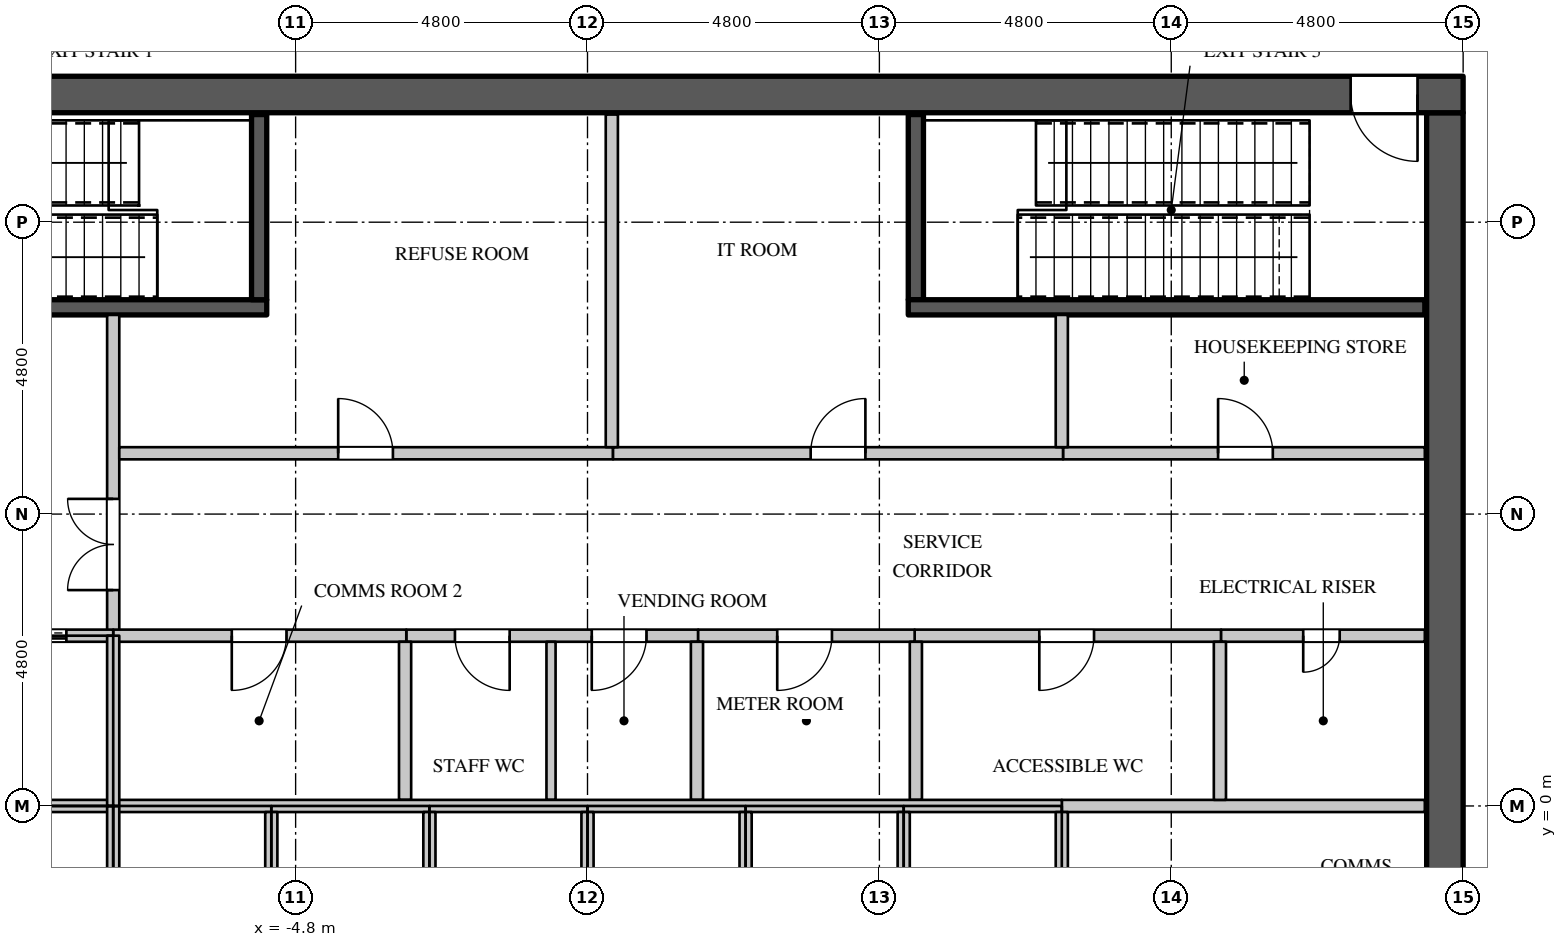
"""IFC4 building model, lengths in metres.
Left out: names, types, materials, properties, quantities, classifications, styles, units other than length and angle.
Written with IfcOpenShell. Run it as: python <this file> out.ifc"""

import sys

from ifc_helpers import new_model, si_unit, direction, frame, frame_2d, origin, place, context, subcontext, project, spatial, rectangle, extrude, element, fill, save


model = new_model("IFC4")
c1 = context("Model", 3, precision=1e-05, world=origin(), true_north=direction((0.0, 1.0)))
c2 = subcontext(c1, "Body", "Model", "MODEL_VIEW")
j1 = project(units=[si_unit("LENGTHUNIT", "METRE"), si_unit("PLANEANGLEUNIT", "RADIAN")], contexts=[c1])
p1 = place(None, origin())
s1 = spatial("IfcSite", under=j1, at=p1, CompositionType="ELEMENT")
p2 = place(p1, origin())
s2 = spatial("IfcBuilding", under=s1, at=p2, CompositionType="ELEMENT")
p3 = place(p2, frame((0.0, 0.0, 314.7)))
s3 = spatial("IfcBuildingStorey", under=s2, at=p3, CompositionType="ELEMENT", Elevation=314.7)
p4 = place(p3, frame((-14.4, 11.7, 0.0), z_axis=(0.0, 0.0, 1.0), x_axis=(1.0, 0.0, 0.0)))
e1 = element("IfcWall", 1, at=p4, inside=s3, PredefinedType="SHEAR", context=c2, shape_type="SweptSolid", body=[
    extrude(rectangle(XDim=28.8, YDim=0.6, at=frame_2d((14.4, 0.0))), origin(), (0.0, 0.0, 1.0), 5.4),
])
p5 = place(p4, frame((0.75, 0.0, 0.0)))
e2 = element("IfcOpeningElement", 2, at=p5, cuts=e1, PredefinedType="OPENING", context=c2, shape_type="SweptSolid", body=[
    extrude(rectangle(XDim=1.1, YDim=2.2, at=frame_2d((0.55, 1.1))), frame((0.0, 0.31, 0.0), z_axis=(0.0, -1.0, 0.0), x_axis=(1.0, 0.0, 0.0)), (0.0, 0.0, 1.0), 0.62),
])
p6 = place(p4, frame((26.95, 0.0, 0.0)))
e3 = element("IfcOpeningElement", 3, at=p6, cuts=e1, PredefinedType="OPENING", context=c2, shape_type="SweptSolid", body=[
    extrude(rectangle(XDim=1.1, YDim=2.2, at=frame_2d((0.55, 1.1))), frame((0.0, 0.31, 0.0), z_axis=(0.0, -1.0, 0.0), x_axis=(1.0, 0.0, 0.0)), (0.0, 0.0, 1.0), 0.62),
])
p7 = place(p3, frame((14.1, -11.4, 0.0), z_axis=(0.0, 0.0, 1.0), x_axis=(0.0, 1.0, 0.0)))
e4 = element("IfcWall", 4, at=p7, inside=s3, PredefinedType="SHEAR", context=c2, shape_type="SweptSolid", body=[
    extrude(rectangle(XDim=22.8, YDim=0.6, at=frame_2d((11.4, 0.0))), origin(), (0.0, 0.0, 1.0), 5.4),
])
p8 = place(p7, frame((6.35, 0.0, 0.0)))
e5 = element("IfcOpeningElement", 5, at=p8, cuts=e4, PredefinedType="OPENING", context=c2, shape_type="SweptSolid", body=[
    extrude(rectangle(XDim=1.5, YDim=2.4, at=frame_2d((0.75, 1.2))), frame((0.0, 0.31, 0.0), z_axis=(0.0, -1.0, 0.0), x_axis=(1.0, 0.0, 0.0)), (0.0, 0.0, 1.0), 0.62),
])
p9 = place(p3, frame((-7.8, 2.8, 0.0), z_axis=(0.0, 0.0, 1.0), x_axis=(0.0, 1.0, 0.0)))
e6 = element("IfcWall", 6, at=p9, inside=s3, PredefinedType="PARTITIONING", context=c2, shape_type="SweptSolid", body=[
    extrude(rectangle(XDim=5.275, YDim=0.2, at=frame_2d((2.637, 0.0))), origin(), (0.0, 0.0, 1.0), 5.1),
])
p10 = place(p9, frame((0.75, 0.0, 0.0)))
e7 = element("IfcOpeningElement", 7, at=p10, cuts=e6, PredefinedType="OPENING", context=c2, shape_type="SweptSolid", body=[
    extrude(rectangle(XDim=1.5, YDim=2.4, at=frame_2d((0.75, 1.2))), frame((0.0, 0.11, 0.0), z_axis=(0.0, -1.0, 0.0), x_axis=(1.0, 0.0, 0.0)), (0.0, 0.0, 1.0), 0.22),
])
p11 = place(p3, frame((-7.7, 5.8, 0.0), z_axis=(0.0, 0.0, 1.0), x_axis=(1.0, 0.0, 0.0)))
e8 = element("IfcWall", 8, at=p11, inside=s3, PredefinedType="PARTITIONING", context=c2, shape_type="SweptSolid", body=[
    extrude(rectangle(XDim=8.12, YDim=0.2, at=frame_2d((4.06, 0.0))), origin(), (0.0, 0.0, 1.0), 5.1),
])
p12 = place(p11, frame((3.6, 0.0, 0.0)))
e9 = element("IfcOpeningElement", 9, at=p12, cuts=e8, PredefinedType="OPENING", context=c2, shape_type="SweptSolid", body=[
    extrude(rectangle(XDim=0.9, YDim=2.2, at=frame_2d((0.45, 1.1))), frame((0.0, 0.11, 0.0), z_axis=(0.0, -1.0, 0.0), x_axis=(1.0, 0.0, 0.0)), (0.0, 0.0, 1.0), 0.22),
])
p13 = place(p3, frame((-2.98, 2.8, 0.0), z_axis=(0.0, 0.0, 1.0), x_axis=(1.0, 0.0, 0.0)))
e10 = element("IfcWall", 10, at=p13, inside=s3, PredefinedType="PARTITIONING", context=c2, shape_type="SweptSolid", body=[
    extrude(rectangle(XDim=4.8, YDim=0.2, at=frame_2d((2.4, 0.0))), origin(), (0.0, 0.0, 1.0), 5.1),
])
p14 = place(p13, frame((0.8, 0.0, 0.0)))
e11 = element("IfcOpeningElement", 11, at=p14, cuts=e10, PredefinedType="OPENING", context=c2, shape_type="SweptSolid", body=[
    extrude(rectangle(XDim=0.9, YDim=2.2, at=frame_2d((0.45, 1.1))), frame((0.0, 0.11, 0.0), z_axis=(0.0, -1.0, 0.0), x_axis=(1.0, 0.0, 0.0)), (0.0, 0.0, 1.0), 0.22),
])
p15 = place(p13, frame((3.05, 0.0, 0.0)))
e12 = element("IfcOpeningElement", 12, at=p15, cuts=e10, PredefinedType="OPENING", context=c2, shape_type="SweptSolid", body=[
    extrude(rectangle(XDim=0.9, YDim=2.2, at=frame_2d((0.45, 1.1))), frame((0.0, 0.11, 0.0), z_axis=(0.0, -1.0, 0.0), x_axis=(1.0, 0.0, 0.0)), (0.0, 0.0, 1.0), 0.22),
])
p16 = place(p3, frame((5.38, 2.8, 0.0), z_axis=(0.0, 0.0, 1.0), x_axis=(1.0, 0.0, 0.0)))
e13 = element("IfcWall", 13, at=p16, inside=s3, PredefinedType="PARTITIONING", context=c2, shape_type="SweptSolid", body=[
    extrude(rectangle(XDim=5.04, YDim=0.2, at=frame_2d((2.52, 0.0))), origin(), (0.0, 0.0, 1.0), 5.1),
])
p17 = place(p16, frame((2.05, 0.0, 0.0)))
e14 = element("IfcOpeningElement", 14, at=p17, cuts=e13, PredefinedType="OPENING", context=c2, shape_type="SweptSolid", body=[
    extrude(rectangle(XDim=0.9, YDim=2.2, at=frame_2d((0.45, 1.1))), frame((0.0, 0.11, 0.0), z_axis=(0.0, -1.0, 0.0), x_axis=(1.0, 0.0, 0.0)), (0.0, 0.0, 1.0), 0.22),
])
p18 = place(p3, frame((7.82, 5.8, 0.0), z_axis=(0.0, 0.0, 1.0), x_axis=(1.0, 0.0, 0.0)))
e15 = element("IfcWall", 15, at=p18, inside=s3, PredefinedType="PARTITIONING", context=c2, shape_type="SweptSolid", body=[
    extrude(rectangle(XDim=5.95, YDim=0.2, at=frame_2d((2.975, 0.0))), origin(), (0.0, 0.0, 1.0), 5.1),
])
p19 = place(p18, frame((2.55, 0.0, 0.0)))
e16 = element("IfcOpeningElement", 16, at=p19, cuts=e15, PredefinedType="OPENING", context=c2, shape_type="SweptSolid", body=[
    extrude(rectangle(XDim=0.9, YDim=2.2, at=frame_2d((0.45, 1.1))), frame((0.0, 0.11, 0.0), z_axis=(0.0, -1.0, 0.0), x_axis=(1.0, 0.0, 0.0)), (0.0, 0.0, 1.0), 0.22),
])
p20 = place(p3, frame((-0.6, 0.1, 0.0), z_axis=(0.0, 0.0, 1.0), x_axis=(0.0, 1.0, 0.0)))
e17 = element("IfcWall", 17, at=p20, inside=s3, PredefinedType="PARTITIONING", context=c2, shape_type="SweptSolid", body=[
    extrude(rectangle(XDim=2.6, YDim=0.15, at=frame_2d((1.3, 0.0))), origin(), (0.0, 0.0, 1.0), 5.1),
])
p21 = place(p3, frame((-7.8, 2.8, 0.0), z_axis=(0.0, 0.0, 1.0), x_axis=(1.0, 0.0, 0.0)))
e18 = element("IfcWall", 18, at=p21, inside=s3, PredefinedType="PARTITIONING", context=c2, shape_type="SweptSolid", body=[
    extrude(rectangle(XDim=4.82, YDim=0.2, at=frame_2d((2.41, 0.0))), origin(), (0.0, 0.0, 1.0), 5.1),
])
p22 = place(p21, frame((1.95, 0.0, 0.0)))
e19 = element("IfcOpeningElement", 19, at=p22, cuts=e18, PredefinedType="OPENING", context=c2, shape_type="SweptSolid", body=[
    extrude(rectangle(XDim=0.9, YDim=2.2, at=frame_2d((0.45, 1.1))), frame((0.0, 0.11, 0.0), z_axis=(0.0, -1.0, 0.0), x_axis=(1.0, 0.0, 0.0)), (0.0, 0.0, 1.0), 0.22),
])
p23 = place(p3, frame((-3.0, 0.1, 0.0), z_axis=(0.0, 0.0, 1.0), x_axis=(0.0, 1.0, 0.0)))
e20 = element("IfcWall", 20, at=p23, inside=s3, PredefinedType="PARTITIONING", context=c2, shape_type="SweptSolid", body=[
    extrude(rectangle(XDim=2.6, YDim=0.2, at=frame_2d((1.3, 0.0))), origin(), (0.0, 0.0, 1.0), 5.1),
])
p24 = place(p3, frame((0.42, 5.8, 0.0), z_axis=(0.0, 0.0, 1.0), x_axis=(1.0, 0.0, 0.0)))
e21 = element("IfcWall", 21, at=p24, inside=s3, PredefinedType="PARTITIONING", context=c2, shape_type="SweptSolid", body=[
    extrude(rectangle(XDim=7.4, YDim=0.2, at=frame_2d((3.7, 0.0))), origin(), (0.0, 0.0, 1.0), 5.1),
])
p25 = place(p24, frame((3.25, 0.0, 0.0)))
e22 = element("IfcOpeningElement", 22, at=p25, cuts=e21, PredefinedType="OPENING", context=c2, shape_type="SweptSolid", body=[
    extrude(rectangle(XDim=0.9, YDim=2.2, at=frame_2d((0.45, 1.1))), frame((0.0, 0.11, 0.0), z_axis=(0.0, -1.0, 0.0), x_axis=(1.0, 0.0, 0.0)), (0.0, 0.0, 1.0), 0.22),
])
p26 = place(p3, frame((0.4, 5.9, 0.0), z_axis=(0.0, 0.0, 1.0), x_axis=(0.0, 1.0, 0.0)))
e23 = element("IfcWall", 23, at=p26, inside=s3, PredefinedType="PARTITIONING", context=c2, shape_type="SweptSolid", body=[
    extrude(rectangle(XDim=5.47, YDim=0.2, at=frame_2d((2.735, 0.0))), origin(), (0.0, 0.0, 1.0), 5.1),
])
p27 = place(p3, frame((1.82, 2.8, 0.0), z_axis=(0.0, 0.0, 1.0), x_axis=(1.0, 0.0, 0.0)))
e24 = element("IfcWall", 24, at=p27, inside=s3, PredefinedType="PARTITIONING", context=c2, shape_type="SweptSolid", body=[
    extrude(rectangle(XDim=3.56, YDim=0.2, at=frame_2d((1.78, 0.0))), origin(), (0.0, 0.0, 1.0), 5.1),
])
p28 = place(p27, frame((1.3, 0.0, 0.0)))
e25 = element("IfcOpeningElement", 25, at=p28, cuts=e24, PredefinedType="OPENING", context=c2, shape_type="SweptSolid", body=[
    extrude(rectangle(XDim=0.9, YDim=2.2, at=frame_2d((0.45, 1.1))), frame((0.0, 0.11, 0.0), z_axis=(0.0, -1.0, 0.0), x_axis=(1.0, 0.0, 0.0)), (0.0, 0.0, 1.0), 0.22),
])
for number, where, z_axis, x_axis in (
    (26, (1.8, 0.1, 0.0), (0.0, 0.0, 1.0), (0.0, 1.0, 0.0)),
    (27, (5.4, 0.1, 0.0), (0.0, 0.0, 1.0), (0.0, 1.0, 0.0)),
):
    element("IfcWall", number, at=place(p3, frame(where, z_axis=z_axis, x_axis=x_axis)), inside=s3, PredefinedType="PARTITIONING", context=c2, shape_type="SweptSolid", body=[
        extrude(rectangle(XDim=2.6, YDim=0.2, at=frame_2d((1.3, 0.0))), origin(), (0.0, 0.0, 1.0), 5.1),
    ])
p29 = place(p3, frame((7.8, 0.0, 0.0), z_axis=(0.0, 0.0, 1.0), x_axis=(1.0, 0.0, 0.0)))
e28 = element("IfcWall", 28, at=p29, inside=s3, PredefinedType="PARTITIONING", context=c2, shape_type="SweptSolid", body=[
    extrude(rectangle(XDim=5.97, YDim=0.2, at=frame_2d((2.985, 0.0))), origin(), (0.0, 0.0, 1.0), 5.1),
])
p30 = place(p3, frame((7.8, 5.9, 0.0), z_axis=(0.0, 0.0, 1.0), x_axis=(0.0, 1.0, 0.0)))
e29 = element("IfcWall", 29, at=p30, inside=s3, PredefinedType="PARTITIONING", context=c2, shape_type="SweptSolid", body=[
    extrude(rectangle(XDim=2.175, YDim=0.2, at=frame_2d((1.087, 0.0))), origin(), (0.0, 0.0, 1.0), 5.1),
])
p31 = place(p3, frame((10.42, 2.8, 0.0), z_axis=(0.0, 0.0, 1.0), x_axis=(1.0, 0.0, 0.0)))
e30 = element("IfcWall", 30, at=p31, inside=s3, PredefinedType="PARTITIONING", context=c2, shape_type="SweptSolid", body=[
    extrude(rectangle(XDim=3.35, YDim=0.2, at=frame_2d((1.675, 0.0))), origin(), (0.0, 0.0, 1.0), 5.1),
])
p32 = place(p31, frame((1.35, 0.0, 0.0)))
e31 = element("IfcOpeningElement", 31, at=p32, cuts=e30, PredefinedType="OPENING", context=c2, shape_type="SweptSolid", body=[
    extrude(rectangle(XDim=0.6, YDim=2.0, at=frame_2d((0.3, 1.0))), frame((0.0, 0.11, 0.0), z_axis=(0.0, -1.0, 0.0), x_axis=(1.0, 0.0, 0.0)), (0.0, 0.0, 1.0), 0.22),
])
p33 = place(p3, frame((10.4, 0.1, 0.0), z_axis=(0.0, 0.0, 1.0), x_axis=(0.0, 1.0, 0.0)))
e32 = element("IfcWall", 32, at=p33, inside=s3, PredefinedType="PARTITIONING", context=c2, shape_type="SweptSolid", body=[
    extrude(rectangle(XDim=2.6, YDim=0.2, at=frame_2d((1.3, 0.0))), origin(), (0.0, 0.0, 1.0), 5.1),
])
p34 = place(p3, frame((-13.77, 0.0, 0.0), z_axis=(0.0, 0.0, 1.0), x_axis=(1.0, 0.0, 0.0)))
e33 = element("IfcWall", 33, at=p34, inside=s3, PredefinedType="PARTITIONING", context=c2, shape_type="SweptSolid", body=[
    extrude(rectangle(XDim=21.57, YDim=0.2, at=frame_2d((10.785, 0.0))), origin(), (0.0, 0.0, 1.0), 5.1),
])
p35 = place(p3, frame((-13.77, 2.8, 0.0), z_axis=(0.0, 0.0, 1.0), x_axis=(1.0, 0.0, 0.0)))
e34 = element("IfcWall", 34, at=p35, inside=s3, PredefinedType="PARTITIONING", context=c2, shape_type="SweptSolid", body=[
    extrude(rectangle(XDim=5.97, YDim=0.2, at=frame_2d((2.985, 0.0))), origin(), (0.0, 0.0, 1.0), 5.1),
])
p36 = place(p35, frame((1.1, 0.0, 0.0)))
e35 = element("IfcOpeningElement", 35, at=p36, cuts=e34, PredefinedType="OPENING", context=c2, shape_type="SweptSolid", body=[
    extrude(rectangle(XDim=1.1, YDim=2.2, at=frame_2d((0.55, 1.1))), frame((0.0, 0.11, 0.0), z_axis=(0.0, -1.0, 0.0), x_axis=(1.0, 0.0, 0.0)), (0.0, 0.0, 1.0), 0.22),
])
p37 = place(p35, frame((4.1, 0.0, 0.0)))
e36 = element("IfcOpeningElement", 36, at=p37, cuts=e34, PredefinedType="OPENING", context=c2, shape_type="SweptSolid", body=[
    extrude(rectangle(XDim=1.1, YDim=2.2, at=frame_2d((0.55, 1.1))), frame((0.0, 0.11, 0.0), z_axis=(0.0, -1.0, 0.0), x_axis=(1.0, 0.0, 0.0)), (0.0, 0.0, 1.0), 0.22),
])
for number, where, z_axis, x_axis in (
    (37, (-7.8, -2.8, 0.0), (0.0, 0.0, 1.0), (0.0, 1.0, 0.0)),
    (38, (-7.8, 0.0, 0.0), (0.0, 0.0, 1.0), (0.0, 1.0, 0.0)),
):
    element("IfcWall", number, at=place(p3, frame(where, z_axis=z_axis, x_axis=x_axis)), inside=s3, PredefinedType="PARTITIONING", context=c2, shape_type="SweptSolid", body=[
        extrude(rectangle(XDim=2.8, YDim=0.2, at=frame_2d((1.4, 0.0))), origin(), (0.0, 0.0, 1.0), 5.1),
    ])
for number, where, z_axis, x_axis in (
    (39, (-5.2, -2.7, 0.0), (0.0, 0.0, 1.0), (0.0, 1.0, 0.0)),
    (40, (-2.6, -2.7, 0.0), (0.0, 0.0, 1.0), (0.0, 1.0, 0.0)),
    (41, (0.0, -2.7, 0.0), (0.0, 0.0, 1.0), (0.0, 1.0, 0.0)),
    (42, (2.6, -2.7, 0.0), (0.0, 0.0, 1.0), (0.0, 1.0, 0.0)),
    (43, (5.2, -2.7, 0.0), (0.0, 0.0, 1.0), (0.0, 1.0, 0.0)),
    (44, (7.8, -2.7, 0.0), (0.0, 0.0, 1.0), (0.0, 1.0, 0.0)),
):
    element("IfcWall", number, at=place(p3, frame(where, z_axis=z_axis, x_axis=x_axis)), inside=s3, PredefinedType="PARTITIONING", context=c2, shape_type="SweptSolid", body=[
        extrude(rectangle(XDim=2.6, YDim=0.2, at=frame_2d((1.3, 0.0))), origin(), (0.0, 0.0, 1.0), 5.1),
    ])
p38 = place(p3, frame((-13.77, 8.2, 0.0), z_axis=(0.0, 0.0, 1.0), x_axis=(1.0, 0.0, 0.0)))
e45 = element("IfcWall", 45, at=p38, inside=s3, PredefinedType="SHEAR", context=c2, shape_type="SweptSolid", body=[
    extrude(rectangle(XDim=8.495, YDim=0.25, at=frame_2d((4.248, 0.0))), origin(), (0.0, 0.0, 1.0), 5.1),
])
p39 = place(p38, frame((0.15, 0.0, 0.0)))
e46 = element("IfcOpeningElement", 46, at=p39, cuts=e45, PredefinedType="OPENING", context=c2, shape_type="SweptSolid", body=[
    extrude(rectangle(XDim=1.1, YDim=2.2, at=frame_2d((0.55, 1.1))), frame((0.0, 0.135, 0.0), z_axis=(0.0, -1.0, 0.0), x_axis=(1.0, 0.0, 0.0)), (0.0, 0.0, 1.0), 0.27),
])
for number, where, z_axis, x_axis in (
    (47, (-5.4, 8.325, 0.0), (0.0, 0.0, 1.0), (0.0, 1.0, 0.0)),
    (48, (5.4, 8.325, 0.0), (0.0, 0.0, 1.0), (0.0, 1.0, 0.0)),
):
    element("IfcWall", number, at=place(p3, frame(where, z_axis=z_axis, x_axis=x_axis)), inside=s3, PredefinedType="SHEAR", context=c2, shape_type="SweptSolid", body=[
        extrude(rectangle(XDim=3.045, YDim=0.25, at=frame_2d((1.522, 0.0))), origin(), (0.0, 0.0, 1.0), 5.1),
    ])
p40 = place(p3, frame((5.275, 8.2, 0.0), z_axis=(0.0, 0.0, 1.0), x_axis=(1.0, 0.0, 0.0)))
e49 = element("IfcWall", 49, at=p40, inside=s3, PredefinedType="SHEAR", context=c2, shape_type="SweptSolid", body=[
    extrude(rectangle(XDim=8.495, YDim=0.25, at=frame_2d((4.248, 0.0))), origin(), (0.0, 0.0, 1.0), 5.1),
])
p41 = place(p32, origin())
e50 = element("IfcDoor", 50, at=p41, inside=s3, OperationType="SINGLE_SWING_RIGHT", PredefinedType="DOOR", context=c2, shape_type="SweptSolid", body=[
    extrude(rectangle(XDim=0.6, YDim=2.0, at=frame_2d((0.3, 1.0))), frame((0.0, 0.025, 0.0), z_axis=(0.0, -1.0, 0.0), x_axis=(1.0, 0.0, 0.0)), (0.0, 0.0, 1.0), 0.05),
])
fill(e31, e50)
p42 = place(p12, origin())
e51 = element("IfcDoor", 51, at=p42, inside=s3, OperationType="SINGLE_SWING_LEFT", PredefinedType="DOOR", context=c2, shape_type="SweptSolid", body=[
    extrude(rectangle(XDim=0.9, YDim=2.2, at=frame_2d((0.45, 1.1))), frame((0.0, 0.025, 0.0), z_axis=(0.0, -1.0, 0.0), x_axis=(1.0, 0.0, 0.0)), (0.0, 0.0, 1.0), 0.05),
])
fill(e9, e51)
p43 = place(p25, origin())
e52 = element("IfcDoor", 52, at=p43, inside=s3, OperationType="SINGLE_SWING_RIGHT", PredefinedType="DOOR", context=c2, shape_type="SweptSolid", body=[
    extrude(rectangle(XDim=0.9, YDim=2.2, at=frame_2d((0.45, 1.1))), frame((0.0, 0.025, 0.0), z_axis=(0.0, -1.0, 0.0), x_axis=(1.0, 0.0, 0.0)), (0.0, 0.0, 1.0), 0.05),
])
fill(e22, e52)
p44 = place(p19, origin())
e53 = element("IfcDoor", 53, at=p44, inside=s3, OperationType="SINGLE_SWING_LEFT", PredefinedType="DOOR", context=c2, shape_type="SweptSolid", body=[
    extrude(rectangle(XDim=0.9, YDim=2.2, at=frame_2d((0.45, 1.1))), frame((0.0, 0.025, 0.0), z_axis=(0.0, -1.0, 0.0), x_axis=(1.0, 0.0, 0.0)), (0.0, 0.0, 1.0), 0.05),
])
fill(e16, e53)
p45 = place(p22, origin())
e54 = element("IfcDoor", 54, at=p45, inside=s3, OperationType="SINGLE_SWING_RIGHT", PredefinedType="DOOR", context=c2, shape_type="SweptSolid", body=[
    extrude(rectangle(XDim=0.9, YDim=2.2, at=frame_2d((0.45, 1.1))), frame((0.0, 0.025, 0.0), z_axis=(0.0, -1.0, 0.0), x_axis=(1.0, 0.0, 0.0)), (0.0, 0.0, 1.0), 0.05),
])
fill(e19, e54)
p46 = place(p14, origin())
e55 = element("IfcDoor", 55, at=p46, inside=s3, OperationType="SINGLE_SWING_LEFT", PredefinedType="DOOR", context=c2, shape_type="SweptSolid", body=[
    extrude(rectangle(XDim=0.9, YDim=2.2, at=frame_2d((0.45, 1.1))), frame((0.0, 0.025, 0.0), z_axis=(0.0, -1.0, 0.0), x_axis=(1.0, 0.0, 0.0)), (0.0, 0.0, 1.0), 0.05),
])
fill(e11, e55)
p47 = place(p15, origin())
e56 = element("IfcDoor", 56, at=p47, inside=s3, OperationType="SINGLE_SWING_RIGHT", PredefinedType="DOOR", context=c2, shape_type="SweptSolid", body=[
    extrude(rectangle(XDim=0.9, YDim=2.2, at=frame_2d((0.45, 1.1))), frame((0.0, 0.025, 0.0), z_axis=(0.0, -1.0, 0.0), x_axis=(1.0, 0.0, 0.0)), (0.0, 0.0, 1.0), 0.05),
])
fill(e12, e56)
p48 = place(p28, origin())
e57 = element("IfcDoor", 57, at=p48, inside=s3, OperationType="SINGLE_SWING_RIGHT", PredefinedType="DOOR", context=c2, shape_type="SweptSolid", body=[
    extrude(rectangle(XDim=0.9, YDim=2.2, at=frame_2d((0.45, 1.1))), frame((0.0, 0.025, 0.0), z_axis=(0.0, -1.0, 0.0), x_axis=(1.0, 0.0, 0.0)), (0.0, 0.0, 1.0), 0.05),
])
fill(e25, e57)
p49 = place(p17, origin())
e58 = element("IfcDoor", 58, at=p49, inside=s3, OperationType="SINGLE_SWING_RIGHT", PredefinedType="DOOR", context=c2, shape_type="SweptSolid", body=[
    extrude(rectangle(XDim=0.9, YDim=2.2, at=frame_2d((0.45, 1.1))), frame((0.0, 0.025, 0.0), z_axis=(0.0, -1.0, 0.0), x_axis=(1.0, 0.0, 0.0)), (0.0, 0.0, 1.0), 0.05),
])
fill(e14, e58)
p50 = place(p37, origin())
e59 = element("IfcDoor", 59, at=p50, inside=s3, OperationType="DOUBLE_DOOR_SLIDING", PredefinedType="DOOR", context=c2, shape_type="SweptSolid", body=[
    extrude(rectangle(XDim=1.1, YDim=2.2, at=frame_2d((0.55, 1.1))), frame((0.0, 0.025, 0.0), z_axis=(0.0, -1.0, 0.0), x_axis=(1.0, 0.0, 0.0)), (0.0, 0.0, 1.0), 0.05),
])
fill(e36, e59)
p51 = place(p10, origin())
e60 = element("IfcDoor", 60, at=p51, inside=s3, OperationType="DOUBLE_DOOR_SINGLE_SWING", PredefinedType="DOOR", context=c2, shape_type="SweptSolid", body=[
    extrude(rectangle(XDim=1.5, YDim=2.4, at=frame_2d((0.75, 1.2))), frame((0.0, 0.025, 0.0), z_axis=(0.0, -1.0, 0.0), x_axis=(1.0, 0.0, 0.0)), (0.0, 0.0, 1.0), 0.05),
])
fill(e7, e60)
p52 = place(p6, origin())
e61 = element("IfcDoor", 61, at=p52, inside=s3, OperationType="SINGLE_SWING_LEFT", PredefinedType="DOOR", context=c2, shape_type="SweptSolid", body=[
    extrude(rectangle(XDim=1.1, YDim=2.2, at=frame_2d((0.55, 1.1))), frame((0.0, -0.245, 0.0), z_axis=(0.0, -1.0, 0.0), x_axis=(1.0, 0.0, 0.0)), (0.0, 0.0, 1.0), 0.05),
])
fill(e3, e61)
save(model, sys.argv[1])
